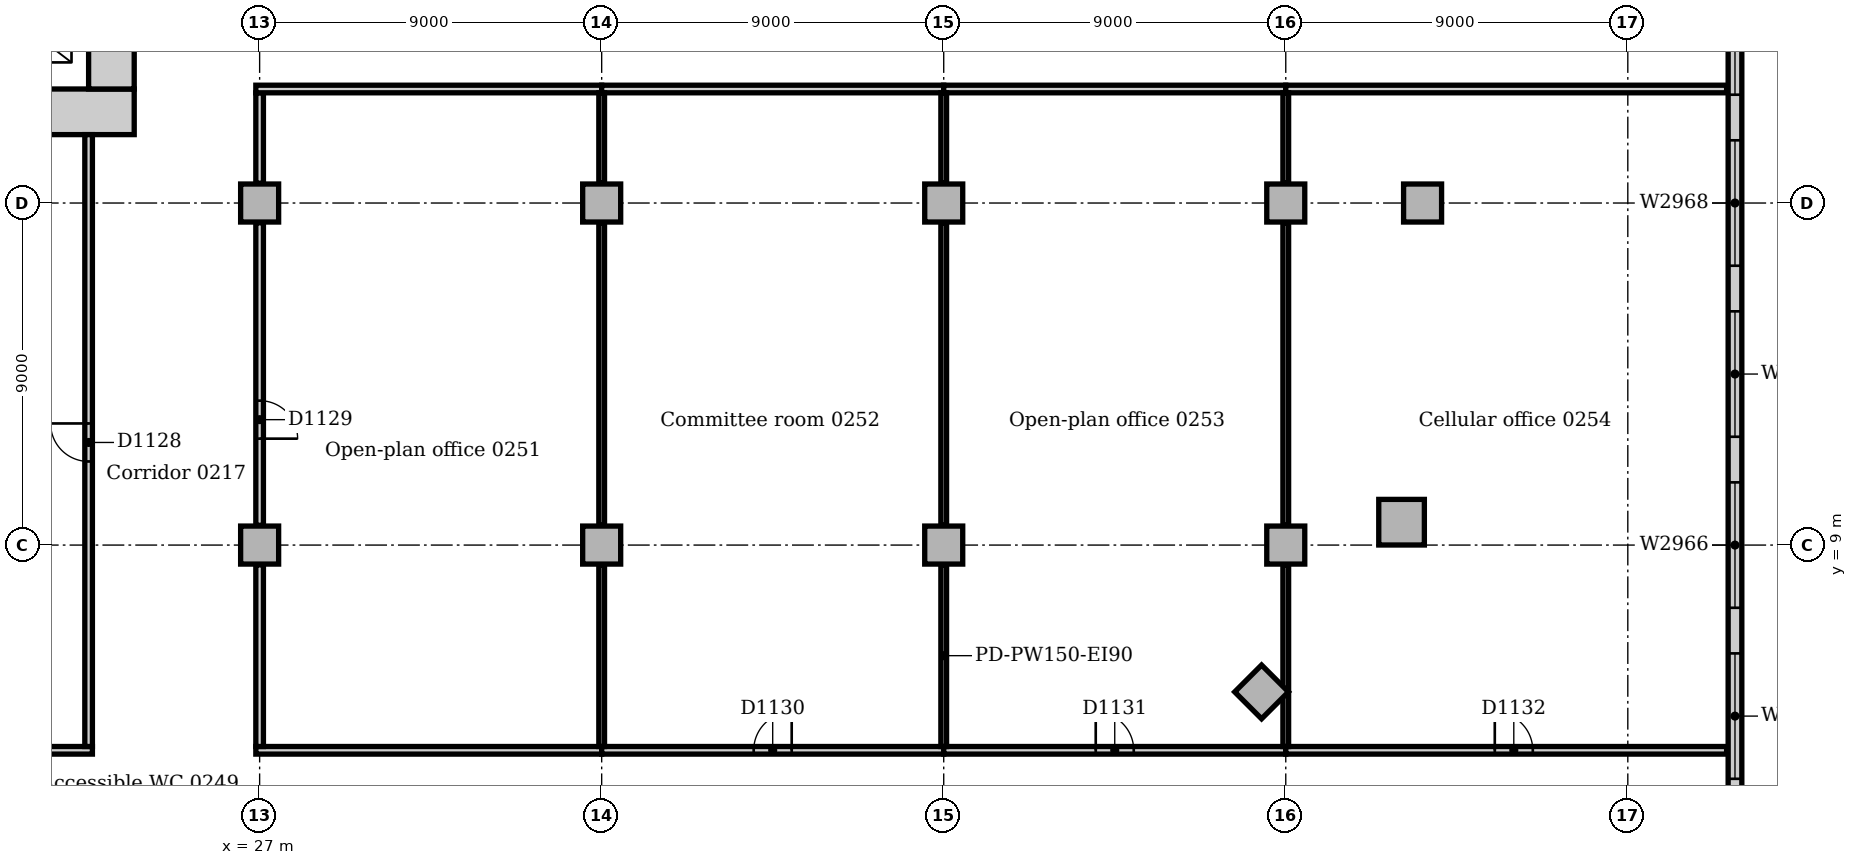
"""IFC4 building model, lengths in metres.
Left out: names, types, materials, properties, quantities, classifications, styles, units other than length and angle.
Written with IfcOpenShell. Run it as: python <this file> out.ifc"""

import sys

from ifc_helpers import new_model, si_unit, direction, frame, frame_2d, origin, origin_2d, place, context, subcontext, project, spatial, rectangle, extrude, element, fill, save


model = new_model("IFC4")
c1 = context("Model", 3, precision=1e-05, world=origin(), true_north=direction((0.0, 1.0)))
c2 = subcontext(c1, "Body", "Model", "MODEL_VIEW")
j1 = project(units=[si_unit("LENGTHUNIT", "METRE"), si_unit("PLANEANGLEUNIT", "RADIAN")], contexts=[c1])
p1 = place(None, origin())
s1 = spatial("IfcSite", under=j1, at=p1, CompositionType="ELEMENT")
p2 = place(p1, origin())
s2 = spatial("IfcBuilding", under=s1, at=p2, CompositionType="ELEMENT")
p3 = place(p2, frame((0.0, 0.0, 11.0)))
s3 = spatial("IfcBuildingStorey", under=s2, at=p3, CompositionType="ELEMENT", Elevation=11.0)
p4 = place(p3, frame((3.9, 20.4, 0.0), z_axis=(0.0, 0.0, 1.0), x_axis=(1.0, 0.0, 0.0)))
e1 = element("IfcWall", 1, at=p4, inside=s3, PredefinedType="SOLIDWALL", context=c2, shape_type="SweptSolid", body=[
    extrude(rectangle(XDim=19.8, YDim=1.2, at=frame_2d((9.9, 0.0))), origin(), (0.0, 0.0, 1.0), 5.0),
])
p5 = place(p3, frame((23.1, 21.0, 0.0), z_axis=(0.0, 0.0, 1.0), x_axis=(0.0, 1.0, 0.0)))
e2 = element("IfcWall", 2, at=p5, inside=s3, PredefinedType="SOLIDWALL", context=c2, shape_type="SweptSolid", body=[
    extrude(rectangle(XDim=10.5, YDim=1.2, at=frame_2d((5.25, 0.0))), origin(), (0.0, 0.0, 1.0), 5.0),
])
p6 = place(p5, frame((4.35, 0.0, 0.0)))
e3 = element("IfcOpeningElement", 3, at=p6, cuts=e2, PredefinedType="OPENING", context=c2, shape_type="SweptSolid", body=[
    extrude(rectangle(XDim=1.8, YDim=2.1, at=frame_2d((0.9, 1.05))), frame((0.0, 0.61, 0.0), z_axis=(0.0, -1.0, 0.0), x_axis=(1.0, 0.0, 0.0)), (0.0, 0.0, 1.0), 1.22),
])
p7 = place(p3, frame((57.047, 9.602, 0.0), z_axis=(0.0, 0.0, 1.0), x_axis=(1.0, 0.0, 0.0)))
e4 = element("IfcColumn", 4, at=p7, inside=s3, PredefinedType="COLUMN", context=c2, shape_type="SweptSolid", body=[
    extrude(rectangle(XDim=1.2, YDim=1.2, at=origin_2d()), origin(), (0.0, 0.0, 1.0), 4.7),
])
for number, where, z_axis, x_axis in (
    (5, (53.364, 5.136, 0.0), (0.0, 0.0, 1.0), (0.707, 0.707, 0.0)),
    (6, (57.6, 18.0, 0.0), (0.0, 0.0, 1.0), (1.0, 0.0, 0.0)),
    (7, (27.0, 9.0, 0.0), (0.0, 0.0, 1.0), (1.0, 0.0, 0.0)),
    (8, (27.0, 18.0, 0.0), (0.0, 0.0, 1.0), (1.0, 0.0, 0.0)),
    (9, (36.0, 9.0, 0.0), (0.0, 0.0, 1.0), (1.0, 0.0, 0.0)),
    (10, (36.0, 18.0, 0.0), (0.0, 0.0, 1.0), (1.0, 0.0, 0.0)),
    (11, (45.0, 9.0, 0.0), (0.0, 0.0, 1.0), (1.0, 0.0, 0.0)),
    (12, (45.0, 18.0, 0.0), (0.0, 0.0, 1.0), (1.0, 0.0, 0.0)),
    (13, (54.0, 9.0, 0.0), (0.0, 0.0, 1.0), (1.0, 0.0, 0.0)),
    (14, (54.0, 18.0, 0.0), (0.0, 0.0, 1.0), (1.0, 0.0, 0.0)),
):
    element("IfcColumn", number, at=place(p3, frame(where, z_axis=z_axis, x_axis=x_axis)), inside=s3, PredefinedType="COLUMN", context=c2, shape_type="SweptSolid", body=[
        extrude(rectangle(XDim=1.0, YDim=1.0, at=origin_2d()), origin(), (0.0, 0.0, 1.0), 4.7),
    ])
p8 = place(p3, frame((65.82, -9.0, 0.0), z_axis=(0.0, 0.0, 1.0), x_axis=(0.0, 1.0, 0.0)))
e15 = element("IfcWall", 15, at=p8, inside=s3, PredefinedType="STANDARD", context=c2, shape_type="SweptSolid", body=[
    extrude(rectangle(XDim=63.0, YDim=0.36, at=frame_2d((31.5, 0.0))), origin(), (0.0, 0.0, 1.0), 4.7),
])
p9 = place(p8, frame((2.85, 0.0, 0.9)))
e16 = element("IfcOpeningElement", 16, at=p9, cuts=e15, PredefinedType="OPENING", context=c2, shape_type="SweptSolid", body=[
    extrude(rectangle(XDim=3.3, YDim=2.4, at=frame_2d((1.65, 1.2))), frame((0.0, 0.19, 0.0), z_axis=(0.0, -1.0, 0.0), x_axis=(1.0, 0.0, 0.0)), (0.0, 0.0, 1.0), 0.38),
])
p10 = place(p8, frame((7.35, 0.0, 0.9)))
e17 = element("IfcOpeningElement", 17, at=p10, cuts=e15, PredefinedType="OPENING", context=c2, shape_type="SweptSolid", body=[
    extrude(rectangle(XDim=3.3, YDim=2.4, at=frame_2d((1.65, 1.2))), frame((0.0, 0.19, 0.0), z_axis=(0.0, -1.0, 0.0), x_axis=(1.0, 0.0, 0.0)), (0.0, 0.0, 1.0), 0.38),
])
p11 = place(p8, frame((11.85, 0.0, 0.9)))
e18 = element("IfcOpeningElement", 18, at=p11, cuts=e15, PredefinedType="OPENING", context=c2, shape_type="SweptSolid", body=[
    extrude(rectangle(XDim=3.3, YDim=2.4, at=frame_2d((1.65, 1.2))), frame((0.0, 0.19, 0.0), z_axis=(0.0, -1.0, 0.0), x_axis=(1.0, 0.0, 0.0)), (0.0, 0.0, 1.0), 0.38),
])
p12 = place(p8, frame((16.35, 0.0, 0.9)))
e19 = element("IfcOpeningElement", 19, at=p12, cuts=e15, PredefinedType="OPENING", context=c2, shape_type="SweptSolid", body=[
    extrude(rectangle(XDim=3.3, YDim=2.4, at=frame_2d((1.65, 1.2))), frame((0.0, 0.19, 0.0), z_axis=(0.0, -1.0, 0.0), x_axis=(1.0, 0.0, 0.0)), (0.0, 0.0, 1.0), 0.38),
])
p13 = place(p8, frame((20.85, 0.0, 0.9)))
e20 = element("IfcOpeningElement", 20, at=p13, cuts=e15, PredefinedType="OPENING", context=c2, shape_type="SweptSolid", body=[
    extrude(rectangle(XDim=3.3, YDim=2.4, at=frame_2d((1.65, 1.2))), frame((0.0, 0.19, 0.0), z_axis=(0.0, -1.0, 0.0), x_axis=(1.0, 0.0, 0.0)), (0.0, 0.0, 1.0), 0.38),
])
p14 = place(p8, frame((25.35, 0.0, 0.9)))
e21 = element("IfcOpeningElement", 21, at=p14, cuts=e15, PredefinedType="OPENING", context=c2, shape_type="SweptSolid", body=[
    extrude(rectangle(XDim=3.3, YDim=2.4, at=frame_2d((1.65, 1.2))), frame((0.0, 0.19, 0.0), z_axis=(0.0, -1.0, 0.0), x_axis=(1.0, 0.0, 0.0)), (0.0, 0.0, 1.0), 0.38),
])
p15 = place(p8, frame((29.85, 0.0, 0.9)))
e22 = element("IfcOpeningElement", 22, at=p15, cuts=e15, PredefinedType="OPENING", context=c2, shape_type="SweptSolid", body=[
    extrude(rectangle(XDim=3.3, YDim=2.4, at=frame_2d((1.65, 1.2))), frame((0.0, 0.19, 0.0), z_axis=(0.0, -1.0, 0.0), x_axis=(1.0, 0.0, 0.0)), (0.0, 0.0, 1.0), 0.38),
])
p16 = place(p8, frame((34.35, 0.0, 0.9)))
e23 = element("IfcOpeningElement", 23, at=p16, cuts=e15, PredefinedType="OPENING", context=c2, shape_type="SweptSolid", body=[
    extrude(rectangle(XDim=3.3, YDim=2.4, at=frame_2d((1.65, 1.2))), frame((0.0, 0.19, 0.0), z_axis=(0.0, -1.0, 0.0), x_axis=(1.0, 0.0, 0.0)), (0.0, 0.0, 1.0), 0.38),
])
p17 = place(p8, frame((38.85, 0.0, 0.9)))
e24 = element("IfcOpeningElement", 24, at=p17, cuts=e15, PredefinedType="OPENING", context=c2, shape_type="SweptSolid", body=[
    extrude(rectangle(XDim=3.3, YDim=2.4, at=frame_2d((1.65, 1.2))), frame((0.0, 0.19, 0.0), z_axis=(0.0, -1.0, 0.0), x_axis=(1.0, 0.0, 0.0)), (0.0, 0.0, 1.0), 0.38),
])
p18 = place(p8, frame((43.35, 0.0, 0.9)))
e25 = element("IfcOpeningElement", 25, at=p18, cuts=e15, PredefinedType="OPENING", context=c2, shape_type="SweptSolid", body=[
    extrude(rectangle(XDim=3.3, YDim=2.4, at=frame_2d((1.65, 1.2))), frame((0.0, 0.19, 0.0), z_axis=(0.0, -1.0, 0.0), x_axis=(1.0, 0.0, 0.0)), (0.0, 0.0, 1.0), 0.38),
])
p19 = place(p8, frame((47.85, 0.0, 0.9)))
e26 = element("IfcOpeningElement", 26, at=p19, cuts=e15, PredefinedType="OPENING", context=c2, shape_type="SweptSolid", body=[
    extrude(rectangle(XDim=3.3, YDim=2.4, at=frame_2d((1.65, 1.2))), frame((0.0, 0.19, 0.0), z_axis=(0.0, -1.0, 0.0), x_axis=(1.0, 0.0, 0.0)), (0.0, 0.0, 1.0), 0.38),
])
p20 = place(p8, frame((52.35, 0.0, 0.9)))
e27 = element("IfcOpeningElement", 27, at=p20, cuts=e15, PredefinedType="OPENING", context=c2, shape_type="SweptSolid", body=[
    extrude(rectangle(XDim=3.3, YDim=2.4, at=frame_2d((1.65, 1.2))), frame((0.0, 0.19, 0.0), z_axis=(0.0, -1.0, 0.0), x_axis=(1.0, 0.0, 0.0)), (0.0, 0.0, 1.0), 0.38),
])
p21 = place(p8, frame((56.85, 0.0, 0.9)))
e28 = element("IfcOpeningElement", 28, at=p21, cuts=e15, PredefinedType="OPENING", context=c2, shape_type="SweptSolid", body=[
    extrude(rectangle(XDim=3.3, YDim=2.4, at=frame_2d((1.65, 1.2))), frame((0.0, 0.19, 0.0), z_axis=(0.0, -1.0, 0.0), x_axis=(1.0, 0.0, 0.0)), (0.0, 0.0, 1.0), 0.38),
])
p22 = place(p3, frame((18.0, 3.6, 0.0), z_axis=(0.0, 0.0, 1.0), x_axis=(1.0, 0.0, 0.0)))
e29 = element("IfcWall", 29, at=p22, inside=s3, PredefinedType="PARTITIONING", context=c2, shape_type="SweptSolid", body=[
    extrude(rectangle(XDim=4.6, YDim=0.2, at=frame_2d((2.3, 0.0))), origin(), (0.0, 0.0, 1.0), 4.7),
])
p23 = place(p3, frame((26.9, 3.6, 0.0), z_axis=(0.0, 0.0, 1.0), x_axis=(1.0, 0.0, 0.0)))
e30 = element("IfcWall", 30, at=p23, inside=s3, PredefinedType="PARTITIONING", context=c2, shape_type="SweptSolid", body=[
    extrude(rectangle(XDim=9.1, YDim=0.2, at=frame_2d((4.55, 0.0))), origin(), (0.0, 0.0, 1.0), 4.7),
])
p24 = place(p3, frame((36.0, 3.6, 0.0), z_axis=(0.0, 0.0, 1.0), x_axis=(1.0, 0.0, 0.0)))
e31 = element("IfcWall", 31, at=p24, inside=s3, PredefinedType="PARTITIONING", context=c2, shape_type="SweptSolid", body=[
    extrude(rectangle(XDim=9.0, YDim=0.2, at=frame_2d((4.5, 0.0))), origin(), (0.0, 0.0, 1.0), 4.7),
])
p25 = place(p24, frame((4.0, 0.0, 0.0)))
e32 = element("IfcOpeningElement", 32, at=p25, cuts=e31, PredefinedType="OPENING", context=c2, shape_type="SweptSolid", body=[
    extrude(rectangle(XDim=1.0, YDim=2.1, at=frame_2d((0.5, 1.05))), frame((0.0, 0.11, 0.0), z_axis=(0.0, -1.0, 0.0), x_axis=(1.0, 0.0, 0.0)), (0.0, 0.0, 1.0), 0.22),
])
p26 = place(p3, frame((45.0, 3.6, 0.0), z_axis=(0.0, 0.0, 1.0), x_axis=(1.0, 0.0, 0.0)))
e33 = element("IfcWall", 33, at=p26, inside=s3, PredefinedType="PARTITIONING", context=c2, shape_type="SweptSolid", body=[
    extrude(rectangle(XDim=9.0, YDim=0.2, at=frame_2d((4.5, 0.0))), origin(), (0.0, 0.0, 1.0), 4.7),
])
p27 = place(p26, frame((4.0, 0.0, 0.0)))
e34 = element("IfcOpeningElement", 34, at=p27, cuts=e33, PredefinedType="OPENING", context=c2, shape_type="SweptSolid", body=[
    extrude(rectangle(XDim=1.0, YDim=2.1, at=frame_2d((0.5, 1.05))), frame((0.0, 0.11, 0.0), z_axis=(0.0, -1.0, 0.0), x_axis=(1.0, 0.0, 0.0)), (0.0, 0.0, 1.0), 0.22),
])
p28 = place(p3, frame((54.0, 3.6, 0.0), z_axis=(0.0, 0.0, 1.0), x_axis=(1.0, 0.0, 0.0)))
e35 = element("IfcWall", 35, at=p28, inside=s3, PredefinedType="PARTITIONING", context=c2, shape_type="SweptSolid", body=[
    extrude(rectangle(XDim=11.6, YDim=0.2, at=frame_2d((5.8, 0.0))), origin(), (0.0, 0.0, 1.0), 4.7),
])
p29 = place(p28, frame((5.5, 0.0, 0.0)))
e36 = element("IfcOpeningElement", 36, at=p29, cuts=e35, PredefinedType="OPENING", context=c2, shape_type="SweptSolid", body=[
    extrude(rectangle(XDim=1.0, YDim=2.1, at=frame_2d((0.5, 1.05))), frame((0.0, 0.11, 0.0), z_axis=(0.0, -1.0, 0.0), x_axis=(1.0, 0.0, 0.0)), (0.0, 0.0, 1.0), 0.22),
])
p30 = place(p3, frame((22.5, 3.7, 0.0), z_axis=(0.0, 0.0, 1.0), x_axis=(0.0, 1.0, 0.0)))
e37 = element("IfcWall", 37, at=p30, inside=s3, PredefinedType="PARTITIONING", context=c2, shape_type="SweptSolid", body=[
    extrude(rectangle(XDim=16.1, YDim=0.2, at=frame_2d((8.05, 0.0))), origin(), (0.0, 0.0, 1.0), 4.7),
])
p31 = place(p30, frame((7.5, 0.0, 0.0)))
e38 = element("IfcOpeningElement", 38, at=p31, cuts=e37, PredefinedType="OPENING", context=c2, shape_type="SweptSolid", body=[
    extrude(rectangle(XDim=1.0, YDim=2.1, at=frame_2d((0.5, 1.05))), frame((0.0, 0.11, 0.0), z_axis=(0.0, -1.0, 0.0), x_axis=(1.0, 0.0, 0.0)), (0.0, 0.0, 1.0), 0.22),
])
p32 = place(p3, frame((27.0, 3.7, 0.0), z_axis=(0.0, 0.0, 1.0), x_axis=(0.0, 1.0, 0.0)))
e39 = element("IfcWall", 39, at=p32, inside=s3, PredefinedType="PARTITIONING", context=c2, shape_type="SweptSolid", body=[
    extrude(rectangle(XDim=4.78, YDim=0.2, at=frame_2d((2.39, 0.0))), origin(), (0.0, 0.0, 1.0), 4.7),
])
p33 = place(p3, frame((27.0, 9.52, 0.0), z_axis=(0.0, 0.0, 1.0), x_axis=(0.0, 1.0, 0.0)))
e40 = element("IfcWall", 40, at=p33, inside=s3, PredefinedType="PARTITIONING", context=c2, shape_type="SweptSolid", body=[
    extrude(rectangle(XDim=7.96, YDim=0.2, at=frame_2d((3.98, 0.0))), origin(), (0.0, 0.0, 1.0), 4.7),
])
p34 = place(p33, frame((2.28, 0.0, 0.0)))
e41 = element("IfcOpeningElement", 41, at=p34, cuts=e40, PredefinedType="OPENING", context=c2, shape_type="SweptSolid", body=[
    extrude(rectangle(XDim=1.0, YDim=2.1, at=frame_2d((0.5, 1.05))), frame((0.0, 0.11, 0.0), z_axis=(0.0, -1.0, 0.0), x_axis=(1.0, 0.0, 0.0)), (0.0, 0.0, 1.0), 0.22),
])
p35 = place(p3, frame((27.0, 18.52, 0.0), z_axis=(0.0, 0.0, 1.0), x_axis=(0.0, 1.0, 0.0)))
e42 = element("IfcWall", 42, at=p35, inside=s3, PredefinedType="PARTITIONING", context=c2, shape_type="SweptSolid", body=[
    extrude(rectangle(XDim=2.38, YDim=0.2, at=frame_2d((1.19, 0.0))), origin(), (0.0, 0.0, 1.0), 4.7),
])
p36 = place(p3, frame((26.9, 21.0, 0.0), z_axis=(0.0, 0.0, 1.0), x_axis=(1.0, 0.0, 0.0)))
e43 = element("IfcWall", 43, at=p36, inside=s3, PredefinedType="PARTITIONING", context=c2, shape_type="SweptSolid", body=[
    extrude(rectangle(XDim=9.1, YDim=0.2, at=frame_2d((4.55, 0.0))), origin(), (0.0, 0.0, 1.0), 4.7),
])
for number, where, z_axis, x_axis in (
    (44, (36.0, 21.0, 0.0), (0.0, 0.0, 1.0), (1.0, 0.0, 0.0)),
    (45, (45.0, 21.0, 0.0), (0.0, 0.0, 1.0), (1.0, 0.0, 0.0)),
):
    element("IfcWall", number, at=place(p3, frame(where, z_axis=z_axis, x_axis=x_axis)), inside=s3, PredefinedType="PARTITIONING", context=c2, shape_type="SweptSolid", body=[
        extrude(rectangle(XDim=9.0, YDim=0.2, at=frame_2d((4.5, 0.0))), origin(), (0.0, 0.0, 1.0), 4.7),
    ])
p37 = place(p3, frame((54.0, 21.0, 0.0), z_axis=(0.0, 0.0, 1.0), x_axis=(1.0, 0.0, 0.0)))
e46 = element("IfcWall", 46, at=p37, inside=s3, PredefinedType="PARTITIONING", context=c2, shape_type="SweptSolid", body=[
    extrude(rectangle(XDim=11.6, YDim=0.2, at=frame_2d((5.8, 0.0))), origin(), (0.0, 0.0, 1.0), 4.7),
])
p38 = place(p3, frame((36.0, 3.7, 0.0), z_axis=(0.0, 0.0, 1.0), x_axis=(0.0, 1.0, 0.0)))
e47 = element("IfcWall", 47, at=p38, inside=s3, PredefinedType="PARTITIONING", context=c2, shape_type="SweptSolid", body=[
    extrude(rectangle(XDim=4.78, YDim=0.15, at=frame_2d((2.39, 0.0))), origin(), (0.0, 0.0, 1.0), 4.7),
])
p39 = place(p3, frame((36.0, 9.52, 0.0), z_axis=(0.0, 0.0, 1.0), x_axis=(0.0, 1.0, 0.0)))
e48 = element("IfcWall", 48, at=p39, inside=s3, PredefinedType="PARTITIONING", context=c2, shape_type="SweptSolid", body=[
    extrude(rectangle(XDim=7.96, YDim=0.15, at=frame_2d((3.98, 0.0))), origin(), (0.0, 0.0, 1.0), 4.7),
])
p40 = place(p3, frame((36.0, 18.52, 0.0), z_axis=(0.0, 0.0, 1.0), x_axis=(0.0, 1.0, 0.0)))
e49 = element("IfcWall", 49, at=p40, inside=s3, PredefinedType="PARTITIONING", context=c2, shape_type="SweptSolid", body=[
    extrude(rectangle(XDim=2.38, YDim=0.15, at=frame_2d((1.19, 0.0))), origin(), (0.0, 0.0, 1.0), 4.7),
])
p41 = place(p3, frame((45.0, 3.7, 0.0), z_axis=(0.0, 0.0, 1.0), x_axis=(0.0, 1.0, 0.0)))
e50 = element("IfcWall", 50, at=p41, inside=s3, PredefinedType="PARTITIONING", context=c2, shape_type="SweptSolid", body=[
    extrude(rectangle(XDim=4.78, YDim=0.15, at=frame_2d((2.39, 0.0))), origin(), (0.0, 0.0, 1.0), 4.7),
])
p42 = place(p3, frame((45.0, 9.52, 0.0), z_axis=(0.0, 0.0, 1.0), x_axis=(0.0, 1.0, 0.0)))
e51 = element("IfcWall", 51, at=p42, inside=s3, PredefinedType="PARTITIONING", context=c2, shape_type="SweptSolid", body=[
    extrude(rectangle(XDim=7.96, YDim=0.15, at=frame_2d((3.98, 0.0))), origin(), (0.0, 0.0, 1.0), 4.7),
])
p43 = place(p3, frame((45.0, 18.52, 0.0), z_axis=(0.0, 0.0, 1.0), x_axis=(0.0, 1.0, 0.0)))
e52 = element("IfcWall", 52, at=p43, inside=s3, PredefinedType="PARTITIONING", context=c2, shape_type="SweptSolid", body=[
    extrude(rectangle(XDim=2.38, YDim=0.15, at=frame_2d((1.19, 0.0))), origin(), (0.0, 0.0, 1.0), 4.7),
])
p44 = place(p3, frame((54.0, 3.7, 0.0), z_axis=(0.0, 0.0, 1.0), x_axis=(0.0, 1.0, 0.0)))
e53 = element("IfcWall", 53, at=p44, inside=s3, PredefinedType="PARTITIONING", context=c2, shape_type="SweptSolid", body=[
    extrude(rectangle(XDim=4.78, YDim=0.15, at=frame_2d((2.39, 0.0))), origin(), (0.0, 0.0, 1.0), 4.7),
])
p45 = place(p3, frame((54.0, 9.52, 0.0), z_axis=(0.0, 0.0, 1.0), x_axis=(0.0, 1.0, 0.0)))
e54 = element("IfcWall", 54, at=p45, inside=s3, PredefinedType="PARTITIONING", context=c2, shape_type="SweptSolid", body=[
    extrude(rectangle(XDim=7.96, YDim=0.15, at=frame_2d((3.98, 0.0))), origin(), (0.0, 0.0, 1.0), 4.7),
])
p46 = place(p3, frame((54.0, 18.52, 0.0), z_axis=(0.0, 0.0, 1.0), x_axis=(0.0, 1.0, 0.0)))
e55 = element("IfcWall", 55, at=p46, inside=s3, PredefinedType="PARTITIONING", context=c2, shape_type="SweptSolid", body=[
    extrude(rectangle(XDim=2.38, YDim=0.15, at=frame_2d((1.19, 0.0))), origin(), (0.0, 0.0, 1.0), 4.7),
])
p47 = place(p11, origin())
e56 = element("IfcWindow", 56, at=p47, inside=s3, PartitioningType="SINGLE_PANEL", PredefinedType="WINDOW", context=c2, shape_type="SweptSolid", body=[
    extrude(rectangle(XDim=3.3, YDim=2.4, at=frame_2d((1.65, 1.2))), frame((0.0, 0.13, 0.0), z_axis=(0.0, -1.0, 0.0), x_axis=(1.0, 0.0, 0.0)), (0.0, 0.0, 1.0), 0.06),
])
fill(e18, e56)
p48 = place(p12, origin())
e57 = element("IfcWindow", 57, at=p48, inside=s3, PartitioningType="SINGLE_PANEL", PredefinedType="WINDOW", context=c2, shape_type="SweptSolid", body=[
    extrude(rectangle(XDim=3.3, YDim=2.4, at=frame_2d((1.65, 1.2))), frame((0.0, 0.13, 0.0), z_axis=(0.0, -1.0, 0.0), x_axis=(1.0, 0.0, 0.0)), (0.0, 0.0, 1.0), 0.06),
])
fill(e19, e57)
p49 = place(p13, origin())
e58 = element("IfcWindow", 58, at=p49, inside=s3, PartitioningType="SINGLE_PANEL", PredefinedType="WINDOW", context=c2, shape_type="SweptSolid", body=[
    extrude(rectangle(XDim=3.3, YDim=2.4, at=frame_2d((1.65, 1.2))), frame((0.0, 0.13, 0.0), z_axis=(0.0, -1.0, 0.0), x_axis=(1.0, 0.0, 0.0)), (0.0, 0.0, 1.0), 0.06),
])
fill(e20, e58)
p50 = place(p14, origin())
e59 = element("IfcWindow", 59, at=p50, inside=s3, PartitioningType="SINGLE_PANEL", PredefinedType="WINDOW", context=c2, shape_type="SweptSolid", body=[
    extrude(rectangle(XDim=3.3, YDim=2.4, at=frame_2d((1.65, 1.2))), frame((0.0, 0.13, 0.0), z_axis=(0.0, -1.0, 0.0), x_axis=(1.0, 0.0, 0.0)), (0.0, 0.0, 1.0), 0.06),
])
fill(e21, e59)
p51 = place(p15, origin())
e60 = element("IfcWindow", 60, at=p51, inside=s3, PartitioningType="SINGLE_PANEL", PredefinedType="WINDOW", context=c2, shape_type="SweptSolid", body=[
    extrude(rectangle(XDim=3.3, YDim=2.4, at=frame_2d((1.65, 1.2))), frame((0.0, 0.13, 0.0), z_axis=(0.0, -1.0, 0.0), x_axis=(1.0, 0.0, 0.0)), (0.0, 0.0, 1.0), 0.06),
])
fill(e22, e60)
p52 = place(p31, origin())
e61 = element("IfcDoor", 61, at=p52, inside=s3, OperationType="SINGLE_SWING_RIGHT", PredefinedType="DOOR", context=c2, shape_type="SweptSolid", body=[
    extrude(rectangle(XDim=1.0, YDim=2.1, at=frame_2d((0.5, 1.05))), frame((0.0, 0.025, 0.0), z_axis=(0.0, -1.0, 0.0), x_axis=(1.0, 0.0, 0.0)), (0.0, 0.0, 1.0), 0.05),
])
fill(e38, e61)
p53 = place(p34, frame((1.0, 0.0, 0.0), z_axis=(0.0, 0.0, 1.0), x_axis=(-1.0, 0.0, 0.0)))
e62 = element("IfcDoor", 62, at=p53, inside=s3, OperationType="SINGLE_SWING_RIGHT", PredefinedType="DOOR", context=c2, shape_type="SweptSolid", body=[
    extrude(rectangle(XDim=1.0, YDim=2.1, at=frame_2d((0.5, 1.05))), frame((0.0, 0.025, 0.0), z_axis=(0.0, -1.0, 0.0), x_axis=(1.0, 0.0, 0.0)), (0.0, 0.0, 1.0), 0.05),
])
fill(e41, e62)
p54 = place(p25, origin())
e63 = element("IfcDoor", 63, at=p54, inside=s3, OperationType="SINGLE_SWING_RIGHT", PredefinedType="DOOR", context=c2, shape_type="SweptSolid", body=[
    extrude(rectangle(XDim=1.0, YDim=2.1, at=frame_2d((0.5, 1.05))), frame((0.0, 0.025, 0.0), z_axis=(0.0, -1.0, 0.0), x_axis=(1.0, 0.0, 0.0)), (0.0, 0.0, 1.0), 0.05),
])
fill(e32, e63)
p55 = place(p27, origin())
e64 = element("IfcDoor", 64, at=p55, inside=s3, OperationType="SINGLE_SWING_LEFT", PredefinedType="DOOR", context=c2, shape_type="SweptSolid", body=[
    extrude(rectangle(XDim=1.0, YDim=2.1, at=frame_2d((0.5, 1.05))), frame((0.0, 0.025, 0.0), z_axis=(0.0, -1.0, 0.0), x_axis=(1.0, 0.0, 0.0)), (0.0, 0.0, 1.0), 0.05),
])
fill(e34, e64)
p56 = place(p29, origin())
e65 = element("IfcDoor", 65, at=p56, inside=s3, OperationType="SINGLE_SWING_LEFT", PredefinedType="DOOR", context=c2, shape_type="SweptSolid", body=[
    extrude(rectangle(XDim=1.0, YDim=2.1, at=frame_2d((0.5, 1.05))), frame((0.0, 0.025, 0.0), z_axis=(0.0, -1.0, 0.0), x_axis=(1.0, 0.0, 0.0)), (0.0, 0.0, 1.0), 0.05),
])
fill(e36, e65)
save(model, sys.argv[1])
